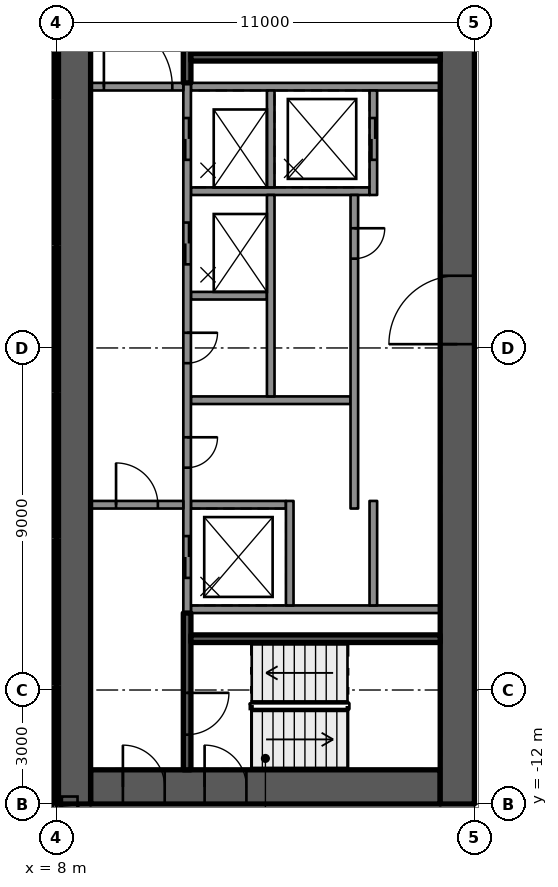
"""IFC4 building model, lengths in metres.
Left out: names, types, materials, properties, quantities, classifications, styles, units other than length and angle.
Written with IfcOpenShell. Run it as: python <this file> out.ifc"""

import sys

from ifc_helpers import new_model, si_unit, direction, frame, frame_2d, origin, place, context, subcontext, project, spatial, rectangle, extrude, element, fill, save


model = new_model("IFC4")
c1 = context("Model", 3, precision=1e-05, world=origin(), true_north=direction((0.0, 1.0)))
c2 = subcontext(c1, "Body", "Model", "MODEL_VIEW")
j1 = project(units=[si_unit("LENGTHUNIT", "METRE"), si_unit("PLANEANGLEUNIT", "RADIAN")], contexts=[c1])
p1 = place(None, origin())
s1 = spatial("IfcSite", under=j1, at=p1, CompositionType="ELEMENT")
p2 = place(p1, origin())
s2 = spatial("IfcBuilding", under=s1, at=p2, CompositionType="ELEMENT")
p3 = place(p2, frame((0.0, 0.0, 257.0)))
s3 = spatial("IfcBuildingStorey", under=s2, at=p3, CompositionType="ELEMENT", Elevation=257.0)
p4 = place(p3, frame((8.9, -11.55, 0.0), z_axis=(0.0, 0.0, 1.0), x_axis=(1.0, 0.0, 0.0)))
e1 = element("IfcWall", 1, at=p4, inside=s3, PredefinedType="SHEAR", context=c2, shape_type="SweptSolid", body=[
    extrude(rectangle(XDim=9.2, YDim=0.9, at=frame_2d((4.6, 0.0))), origin(), (0.0, 0.0, 1.0), 3.5),
])
p5 = place(p4, frame((0.85, 0.0, 0.0)))
e2 = element("IfcOpeningElement", 2, at=p5, cuts=e1, PredefinedType="OPENING", context=c2, shape_type="SweptSolid", body=[
    extrude(rectangle(XDim=1.1, YDim=2.1, at=frame_2d((0.55, 1.05))), frame((0.0, 0.46, 0.0), z_axis=(0.0, -1.0, 0.0), x_axis=(1.0, 0.0, 0.0)), (0.0, 0.0, 1.0), 0.92),
])
p6 = place(p4, frame((3.0, 0.0, 0.0)))
e3 = element("IfcOpeningElement", 3, at=p6, cuts=e1, PredefinedType="OPENING", context=c2, shape_type="SweptSolid", body=[
    extrude(rectangle(XDim=1.1, YDim=2.1, at=frame_2d((0.55, 1.05))), frame((0.0, 0.46, 0.0), z_axis=(0.0, -1.0, 0.0), x_axis=(1.0, 0.0, 0.0)), (0.0, 0.0, 1.0), 0.92),
])
p7 = place(p3, frame((8.45, -12.0, 0.0), z_axis=(0.0, 0.0, 1.0), x_axis=(0.0, 1.0, 0.0)))
e4 = element("IfcWall", 4, at=p7, inside=s3, PredefinedType="SHEAR", context=c2, shape_type="SweptSolid", body=[
    extrude(rectangle(XDim=24.0, YDim=0.9, at=frame_2d((12.0, 0.0))), origin(), (0.0, 0.0, 1.0), 3.5),
])
p8 = place(p3, frame((18.55, -12.0, 0.0), z_axis=(0.0, 0.0, 1.0), x_axis=(0.0, 1.0, 0.0)))
e5 = element("IfcWall", 5, at=p8, inside=s3, PredefinedType="SHEAR", context=c2, shape_type="SweptSolid", body=[
    extrude(rectangle(XDim=24.0, YDim=0.9, at=frame_2d((12.0, 0.0))), origin(), (0.0, 0.0, 1.0), 3.5),
])
p9 = place(p8, frame((12.1, 0.0, 0.0)))
e6 = element("IfcOpeningElement", 6, at=p9, cuts=e5, PredefinedType="OPENING", context=c2, shape_type="SweptSolid", body=[
    extrude(rectangle(XDim=1.8, YDim=2.1, at=frame_2d((0.9, 1.05))), frame((0.0, 0.46, 0.0), z_axis=(0.0, -1.0, 0.0), x_axis=(1.0, 0.0, 0.0)), (0.0, 0.0, 1.0), 0.92),
])
for number, where, z_axis, x_axis in (
    (7, (11.54, -6.875, 0.0), (0.0, 0.0, 1.0), (1.0, 0.0, 0.0)),
    (8, (11.54, 6.875, 0.0), (0.0, 0.0, 1.0), (1.0, 0.0, 0.0)),
):
    element("IfcWall", number, at=place(p3, frame(where, z_axis=z_axis, x_axis=x_axis)), inside=s3, PredefinedType="SOLIDWALL", context=c2, shape_type="SweptSolid", body=[
        extrude(rectangle(XDim=6.56, YDim=0.2, at=frame_2d((3.28, 0.0))), origin(), (0.0, 0.0, 1.0), 3.09),
    ])
p10 = place(p3, frame((11.54, 4.125, 0.0), z_axis=(0.0, 0.0, 1.0), x_axis=(1.0, 0.0, 0.0)))
e9 = element("IfcWall", 9, at=p10, inside=s3, PredefinedType="SOLIDWALL", context=c2, shape_type="SweptSolid", body=[
    extrude(rectangle(XDim=4.7, YDim=0.2, at=frame_2d((2.35, 0.0))), origin(), (0.0, 0.0, 1.0), 3.09),
])
p11 = place(p3, frame((11.54, 1.375, 0.0), z_axis=(0.0, 0.0, 1.0), x_axis=(1.0, 0.0, 0.0)))
e10 = element("IfcWall", 10, at=p11, inside=s3, PredefinedType="SOLIDWALL", context=c2, shape_type="SweptSolid", body=[
    extrude(rectangle(XDim=2.0, YDim=0.2, at=frame_2d((1.0, 0.0))), origin(), (0.0, 0.0, 1.0), 3.09),
])
p12 = place(p3, frame((11.54, -1.375, 0.0), z_axis=(0.0, 0.0, 1.0), x_axis=(1.0, 0.0, 0.0)))
e11 = element("IfcWall", 11, at=p12, inside=s3, PredefinedType="SOLIDWALL", context=c2, shape_type="SweptSolid", body=[
    extrude(rectangle(XDim=4.2, YDim=0.2, at=frame_2d((2.1, 0.0))), origin(), (0.0, 0.0, 1.0), 3.09),
])
p13 = place(p3, frame((11.54, -4.125, 0.0), z_axis=(0.0, 0.0, 1.0), x_axis=(1.0, 0.0, 0.0)))
e12 = element("IfcWall", 12, at=p13, inside=s3, PredefinedType="SOLIDWALL", context=c2, shape_type="SweptSolid", body=[
    extrude(rectangle(XDim=2.5, YDim=0.2, at=frame_2d((1.25, 0.0))), origin(), (0.0, 0.0, 1.0), 3.09),
])
p14 = place(p3, frame((11.44, 6.975, 0.0), z_axis=(0.0, 0.0, 1.0), x_axis=(0.0, -1.0, 0.0)))
e13 = element("IfcWall", 13, at=p14, inside=s3, PredefinedType="SOLIDWALL", context=c2, shape_type="SweptSolid", body=[
    extrude(rectangle(XDim=13.95, YDim=0.2, at=frame_2d((6.975, 0.0))), origin(), (0.0, 0.0, 1.0), 3.09),
])
p15 = place(p14, frame((0.925, 0.0, 0.0)))
e14 = element("IfcOpeningElement", 14, at=p15, cuts=e13, PredefinedType="OPENING", context=c2, shape_type="SweptSolid", body=[
    extrude(rectangle(XDim=1.1, YDim=2.1, at=frame_2d((0.55, 1.05))), frame((0.0, 0.11, 0.0), z_axis=(0.0, -1.0, 0.0), x_axis=(1.0, 0.0, 0.0)), (0.0, 0.0, 1.0), 0.22),
])
p16 = place(p14, frame((3.675, 0.0, 0.0)))
e15 = element("IfcOpeningElement", 15, at=p16, cuts=e13, PredefinedType="OPENING", context=c2, shape_type="SweptSolid", body=[
    extrude(rectangle(XDim=1.1, YDim=2.1, at=frame_2d((0.55, 1.05))), frame((0.0, 0.11, 0.0), z_axis=(0.0, -1.0, 0.0), x_axis=(1.0, 0.0, 0.0)), (0.0, 0.0, 1.0), 0.22),
])
p17 = place(p14, frame((11.925, 0.0, 0.0)))
e16 = element("IfcOpeningElement", 16, at=p17, cuts=e13, PredefinedType="OPENING", context=c2, shape_type="SweptSolid", body=[
    extrude(rectangle(XDim=1.1, YDim=2.1, at=frame_2d((0.55, 1.05))), frame((0.0, 0.11, 0.0), z_axis=(0.0, -1.0, 0.0), x_axis=(1.0, 0.0, 0.0)), (0.0, 0.0, 1.0), 0.22),
])
p18 = place(p14, frame((6.575, 0.0, 0.0)))
e17 = element("IfcOpeningElement", 17, at=p18, cuts=e13, PredefinedType="OPENING", context=c2, shape_type="SweptSolid", body=[
    extrude(rectangle(XDim=0.8, YDim=2.1, at=frame_2d((0.4, 1.05))), frame((0.0, 0.11, 0.0), z_axis=(0.0, -1.0, 0.0), x_axis=(1.0, 0.0, 0.0)), (0.0, 0.0, 1.0), 0.22),
])
p19 = place(p14, frame((9.325, 0.0, 0.0)))
e18 = element("IfcOpeningElement", 18, at=p19, cuts=e13, PredefinedType="OPENING", context=c2, shape_type="SweptSolid", body=[
    extrude(rectangle(XDim=0.8, YDim=2.1, at=frame_2d((0.4, 1.05))), frame((0.0, 0.11, 0.0), z_axis=(0.0, -1.0, 0.0), x_axis=(1.0, 0.0, 0.0)), (0.0, 0.0, 1.0), 0.22),
])
p20 = place(p3, frame((13.64, 6.775, 0.0), z_axis=(0.0, 0.0, 1.0), x_axis=(0.0, -1.0, 0.0)))
e19 = element("IfcWall", 19, at=p20, inside=s3, PredefinedType="SOLIDWALL", context=c2, shape_type="SweptSolid", body=[
    extrude(rectangle(XDim=2.55, YDim=0.2, at=frame_2d((1.275, 0.0))), origin(), (0.0, 0.0, 1.0), 3.09),
])
p21 = place(p3, frame((13.64, 4.025, 0.0), z_axis=(0.0, 0.0, 1.0), x_axis=(0.0, -1.0, 0.0)))
e20 = element("IfcWall", 20, at=p21, inside=s3, PredefinedType="SOLIDWALL", context=c2, shape_type="SweptSolid", body=[
    extrude(rectangle(XDim=5.3, YDim=0.2, at=frame_2d((2.65, 0.0))), origin(), (0.0, 0.0, 1.0), 3.09),
])
p22 = place(p3, frame((14.14, -4.025, 0.0), z_axis=(0.0, 0.0, 1.0), x_axis=(0.0, -1.0, 0.0)))
e21 = element("IfcWall", 21, at=p22, inside=s3, PredefinedType="SOLIDWALL", context=c2, shape_type="SweptSolid", body=[
    extrude(rectangle(XDim=2.75, YDim=0.2, at=frame_2d((1.375, 0.0))), origin(), (0.0, 0.0, 1.0), 3.09),
])
p23 = place(p3, frame((16.34, 6.775, 0.0), z_axis=(0.0, 0.0, 1.0), x_axis=(0.0, -1.0, 0.0)))
e22 = element("IfcWall", 22, at=p23, inside=s3, PredefinedType="SOLIDWALL", context=c2, shape_type="SweptSolid", body=[
    extrude(rectangle(XDim=2.75, YDim=0.2, at=frame_2d((1.375, 0.0))), origin(), (0.0, 0.0, 1.0), 3.09),
])
p24 = place(p23, frame((0.725, 0.0, 0.0)))
e23 = element("IfcOpeningElement", 23, at=p24, cuts=e22, PredefinedType="OPENING", context=c2, shape_type="SweptSolid", body=[
    extrude(rectangle(XDim=1.1, YDim=2.1, at=frame_2d((0.55, 1.05))), frame((0.0, 0.11, 0.0), z_axis=(0.0, -1.0, 0.0), x_axis=(1.0, 0.0, 0.0)), (0.0, 0.0, 1.0), 0.22),
])
p25 = place(p3, frame((15.84, 4.025, 0.0), z_axis=(0.0, 0.0, 1.0), x_axis=(0.0, -1.0, 0.0)))
e24 = element("IfcWall", 24, at=p25, inside=s3, PredefinedType="SOLIDWALL", context=c2, shape_type="SweptSolid", body=[
    extrude(rectangle(XDim=8.25, YDim=0.2, at=frame_2d((4.125, 0.0))), origin(), (0.0, 0.0, 1.0), 3.09),
])
p26 = place(p25, frame((0.875, 0.0, 0.0)))
e25 = element("IfcOpeningElement", 25, at=p26, cuts=e24, PredefinedType="OPENING", context=c2, shape_type="SweptSolid", body=[
    extrude(rectangle(XDim=0.8, YDim=2.1, at=frame_2d((0.4, 1.05))), frame((0.0, 0.11, 0.0), z_axis=(0.0, -1.0, 0.0), x_axis=(1.0, 0.0, 0.0)), (0.0, 0.0, 1.0), 0.22),
])
p27 = place(p3, frame((16.34, -4.025, 0.0), z_axis=(0.0, 0.0, 1.0), x_axis=(0.0, -1.0, 0.0)))
e26 = element("IfcWall", 26, at=p27, inside=s3, PredefinedType="SOLIDWALL", context=c2, shape_type="SweptSolid", body=[
    extrude(rectangle(XDim=2.75, YDim=0.2, at=frame_2d((1.375, 0.0))), origin(), (0.0, 0.0, 1.0), 3.09),
])
p28 = place(p3, frame((11.44, -6.975, 0.0), z_axis=(0.0, 0.0, 1.0), x_axis=(0.0, -1.0, 0.0)))
e27 = element("IfcWall", 27, at=p28, inside=s3, PredefinedType="SOLIDWALL", context=c2, shape_type="SweptSolid", body=[
    extrude(rectangle(XDim=4.125, YDim=0.2, at=frame_2d((2.062, 0.0))), origin(), (0.0, 0.0, 1.0), 3.09),
])
p29 = place(p28, frame((2.1, 0.0, 0.0)))
e28 = element("IfcOpeningElement", 28, at=p29, cuts=e27, PredefinedType="OPENING", context=c2, shape_type="SweptSolid", body=[
    extrude(rectangle(XDim=1.1, YDim=2.1, at=frame_2d((0.55, 1.05))), frame((0.0, 0.11, 0.0), z_axis=(0.0, -1.0, 0.0), x_axis=(1.0, 0.0, 0.0)), (0.0, 0.0, 1.0), 0.22),
])
p30 = place(p3, frame((11.54, -7.65, 0.0), z_axis=(0.0, 0.0, 1.0), x_axis=(1.0, 0.0, 0.0)))
e29 = element("IfcWall", 29, at=p30, inside=s3, PredefinedType="SOLIDWALL", context=c2, shape_type="SweptSolid", body=[
    extrude(rectangle(XDim=6.56, YDim=0.2, at=frame_2d((3.28, 0.0))), origin(), (0.0, 0.0, 1.0), 3.09),
])
p31 = place(p3, frame((11.44, 11.1, 0.0), z_axis=(0.0, 0.0, 1.0), x_axis=(0.0, -1.0, 0.0)))
e30 = element("IfcWall", 30, at=p31, inside=s3, PredefinedType="SOLIDWALL", context=c2, shape_type="SweptSolid", body=[
    extrude(rectangle(XDim=4.125, YDim=0.2, at=frame_2d((2.062, 0.0))), origin(), (0.0, 0.0, 1.0), 3.09),
])
p32 = place(p3, frame((11.54, 7.65, 0.0), z_axis=(0.0, 0.0, 1.0), x_axis=(1.0, 0.0, 0.0)))
e31 = element("IfcWall", 31, at=p32, inside=s3, PredefinedType="SOLIDWALL", context=c2, shape_type="SweptSolid", body=[
    extrude(rectangle(XDim=6.56, YDim=0.2, at=frame_2d((3.28, 0.0))), origin(), (0.0, 0.0, 1.0), 3.09),
])
p33 = place(p3, frame((8.9, -4.125, 0.0), z_axis=(0.0, 0.0, 1.0), x_axis=(1.0, 0.0, 0.0)))
e32 = element("IfcWall", 32, at=p33, inside=s3, PredefinedType="PARTITIONING", context=c2, shape_type="SweptSolid", body=[
    extrude(rectangle(XDim=2.44, YDim=0.2, at=frame_2d((1.22, 0.0))), origin(), (0.0, 0.0, 1.0), 3.09),
])
p34 = place(p33, frame((0.67, 0.0, 0.0)))
e33 = element("IfcOpeningElement", 33, at=p34, cuts=e32, PredefinedType="OPENING", context=c2, shape_type="SweptSolid", body=[
    extrude(rectangle(XDim=1.1, YDim=2.1, at=frame_2d((0.55, 1.05))), frame((0.0, 0.11, 0.0), z_axis=(0.0, -1.0, 0.0), x_axis=(1.0, 0.0, 0.0)), (0.0, 0.0, 1.0), 0.22),
])
p35 = place(p3, frame((8.9, 6.875, 0.0), z_axis=(0.0, 0.0, 1.0), x_axis=(1.0, 0.0, 0.0)))
e34 = element("IfcWall", 34, at=p35, inside=s3, PredefinedType="PARTITIONING", context=c2, shape_type="SweptSolid", body=[
    extrude(rectangle(XDim=2.44, YDim=0.2, at=frame_2d((1.22, 0.0))), origin(), (0.0, 0.0, 1.0), 3.09),
])
p36 = place(p35, frame((0.35, 0.0, 0.0)))
e35 = element("IfcOpeningElement", 35, at=p36, cuts=e34, PredefinedType="OPENING", context=c2, shape_type="SweptSolid", body=[
    extrude(rectangle(XDim=1.8, YDim=2.1, at=frame_2d((0.9, 1.05))), frame((0.0, 0.11, 0.0), z_axis=(0.0, -1.0, 0.0), x_axis=(1.0, 0.0, 0.0)), (0.0, 0.0, 1.0), 0.22),
])
p37 = place(p15, origin())
e36 = element("IfcDoor", 36, at=p37, inside=s3, OperationType="DOUBLE_DOOR_SLIDING", PredefinedType="DOOR", context=c2, shape_type="SweptSolid", body=[
    extrude(rectangle(XDim=1.1, YDim=2.1, at=frame_2d((0.55, 1.05))), frame((0.0, 0.025, 0.0), z_axis=(0.0, -1.0, 0.0), x_axis=(1.0, 0.0, 0.0)), (0.0, 0.0, 1.0), 0.05),
])
fill(e14, e36)
p38 = place(p24, origin())
e37 = element("IfcDoor", 37, at=p38, inside=s3, OperationType="DOUBLE_DOOR_SLIDING", PredefinedType="DOOR", context=c2, shape_type="SweptSolid", body=[
    extrude(rectangle(XDim=1.1, YDim=2.1, at=frame_2d((0.55, 1.05))), frame((0.0, 0.025, 0.0), z_axis=(0.0, -1.0, 0.0), x_axis=(1.0, 0.0, 0.0)), (0.0, 0.0, 1.0), 0.05),
])
fill(e23, e37)
p39 = place(p16, origin())
e38 = element("IfcDoor", 38, at=p39, inside=s3, OperationType="DOUBLE_DOOR_SLIDING", PredefinedType="DOOR", context=c2, shape_type="SweptSolid", body=[
    extrude(rectangle(XDim=1.1, YDim=2.1, at=frame_2d((0.55, 1.05))), frame((0.0, 0.025, 0.0), z_axis=(0.0, -1.0, 0.0), x_axis=(1.0, 0.0, 0.0)), (0.0, 0.0, 1.0), 0.05),
])
fill(e15, e38)
p40 = place(p17, origin())
e39 = element("IfcDoor", 39, at=p40, inside=s3, OperationType="DOUBLE_DOOR_SLIDING", PredefinedType="DOOR", context=c2, shape_type="SweptSolid", body=[
    extrude(rectangle(XDim=1.1, YDim=2.1, at=frame_2d((0.55, 1.05))), frame((0.0, 0.025, 0.0), z_axis=(0.0, -1.0, 0.0), x_axis=(1.0, 0.0, 0.0)), (0.0, 0.0, 1.0), 0.05),
])
fill(e16, e39)
p41 = place(p26, origin())
e40 = element("IfcDoor", 40, at=p41, inside=s3, OperationType="SINGLE_SWING_LEFT", PredefinedType="DOOR", context=c2, shape_type="SweptSolid", body=[
    extrude(rectangle(XDim=0.8, YDim=2.1, at=frame_2d((0.4, 1.05))), frame((0.0, 0.025, 0.0), z_axis=(0.0, -1.0, 0.0), x_axis=(1.0, 0.0, 0.0)), (0.0, 0.0, 1.0), 0.05),
])
fill(e25, e40)
p42 = place(p18, origin())
e41 = element("IfcDoor", 41, at=p42, inside=s3, OperationType="SINGLE_SWING_LEFT", PredefinedType="DOOR", context=c2, shape_type="SweptSolid", body=[
    extrude(rectangle(XDim=0.8, YDim=2.1, at=frame_2d((0.4, 1.05))), frame((0.0, 0.025, 0.0), z_axis=(0.0, -1.0, 0.0), x_axis=(1.0, 0.0, 0.0)), (0.0, 0.0, 1.0), 0.05),
])
fill(e17, e41)
p43 = place(p19, origin())
e42 = element("IfcDoor", 42, at=p43, inside=s3, OperationType="SINGLE_SWING_LEFT", PredefinedType="DOOR", context=c2, shape_type="SweptSolid", body=[
    extrude(rectangle(XDim=0.8, YDim=2.1, at=frame_2d((0.4, 1.05))), frame((0.0, 0.025, 0.0), z_axis=(0.0, -1.0, 0.0), x_axis=(1.0, 0.0, 0.0)), (0.0, 0.0, 1.0), 0.05),
])
fill(e18, e42)
p44 = place(p9, origin())
e43 = element("IfcDoor", 43, at=p44, inside=s3, OperationType="SINGLE_SWING_RIGHT", PredefinedType="DOOR", context=c2, shape_type="SweptSolid", body=[
    extrude(rectangle(XDim=1.8, YDim=2.1, at=frame_2d((0.9, 1.05))), frame((0.0, 0.025, 0.0), z_axis=(0.0, -1.0, 0.0), x_axis=(1.0, 0.0, 0.0)), (0.0, 0.0, 1.0), 0.05),
])
fill(e6, e43)
p45 = place(p5, origin())
e44 = element("IfcDoor", 44, at=p45, inside=s3, OperationType="SINGLE_SWING_LEFT", PredefinedType="DOOR", context=c2, shape_type="SweptSolid", body=[
    extrude(rectangle(XDim=1.1, YDim=2.1, at=frame_2d((0.55, 1.05))), frame((0.0, 0.025, 0.0), z_axis=(0.0, -1.0, 0.0), x_axis=(1.0, 0.0, 0.0)), (0.0, 0.0, 1.0), 0.05),
])
fill(e2, e44)
p46 = place(p34, origin())
e45 = element("IfcDoor", 45, at=p46, inside=s3, OperationType="SINGLE_SWING_RIGHT", PredefinedType="DOOR", context=c2, shape_type="SweptSolid", body=[
    extrude(rectangle(XDim=1.1, YDim=2.1, at=frame_2d((0.55, 1.05))), frame((0.0, 0.025, 0.0), z_axis=(0.0, -1.0, 0.0), x_axis=(1.0, 0.0, 0.0)), (0.0, 0.0, 1.0), 0.05),
])
fill(e33, e45)
p47 = place(p36, origin())
e46 = element("IfcDoor", 46, at=p47, inside=s3, OperationType="DOUBLE_DOOR_DOUBLE_SWING", PredefinedType="DOOR", context=c2, shape_type="SweptSolid", body=[
    extrude(rectangle(XDim=1.8, YDim=2.1, at=frame_2d((0.9, 1.05))), frame((0.0, 0.025, 0.0), z_axis=(0.0, -1.0, 0.0), x_axis=(1.0, 0.0, 0.0)), (0.0, 0.0, 1.0), 0.05),
])
fill(e35, e46)
p48 = place(p6, origin())
e47 = element("IfcDoor", 47, at=p48, inside=s3, OperationType="SINGLE_SWING_LEFT", PredefinedType="DOOR", context=c2, shape_type="SweptSolid", body=[
    extrude(rectangle(XDim=1.1, YDim=2.1, at=frame_2d((0.55, 1.05))), frame((0.0, 0.025, 0.0), z_axis=(0.0, -1.0, 0.0), x_axis=(1.0, 0.0, 0.0)), (0.0, 0.0, 1.0), 0.05),
])
fill(e3, e47)
p49 = place(p29, origin())
e48 = element("IfcDoor", 48, at=p49, inside=s3, OperationType="SINGLE_SWING_RIGHT", PredefinedType="DOOR", context=c2, shape_type="SweptSolid", body=[
    extrude(rectangle(XDim=1.1, YDim=2.1, at=frame_2d((0.55, 1.05))), frame((0.0, 0.025, 0.0), z_axis=(0.0, -1.0, 0.0), x_axis=(1.0, 0.0, 0.0)), (0.0, 0.0, 1.0), 0.05),
])
fill(e28, e48)
save(model, sys.argv[1])
